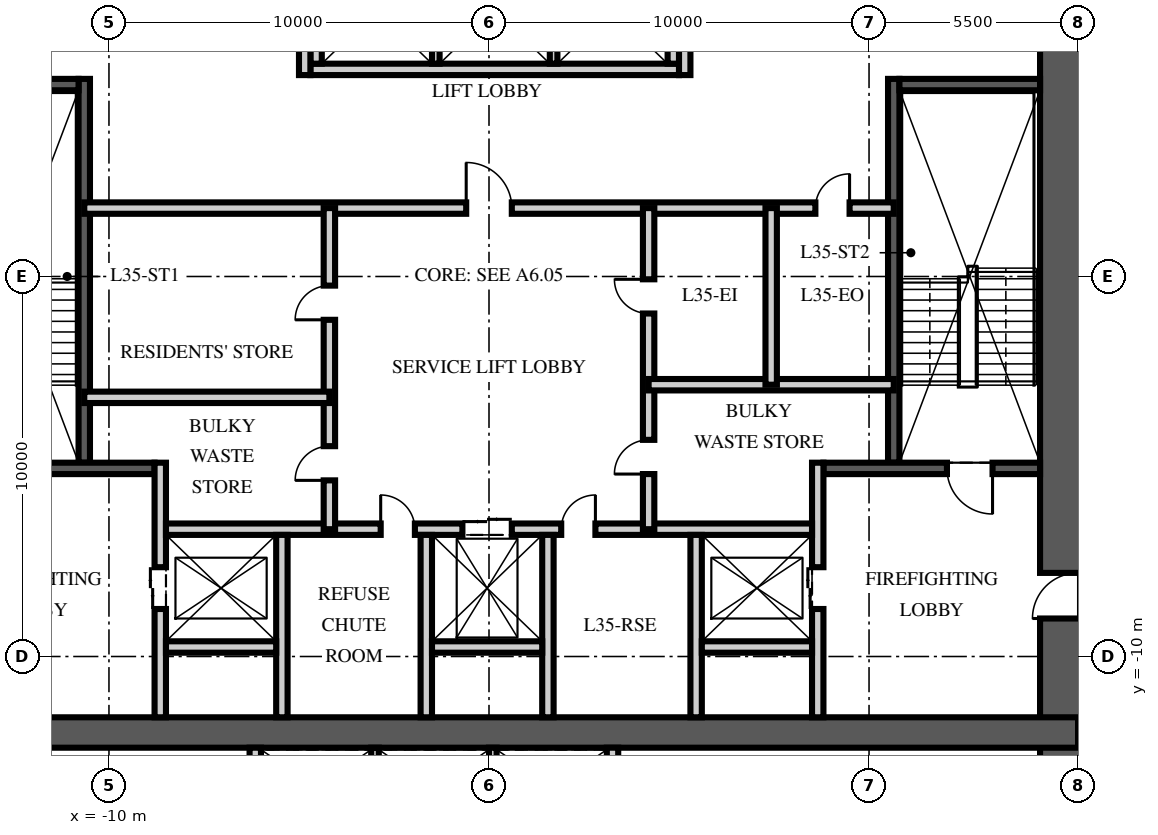
"""IFC4 building model, lengths in metres.
Left out: names, types, materials, properties, quantities, classifications, styles, units other than length and angle.
Written with IfcOpenShell. Run it as: python <this file> out.ifc"""

import sys

from ifc_helpers import new_model, si_unit, direction, frame, frame_2d, origin, place, context, subcontext, project, spatial, rectangle, extrude, element, fill, save


model = new_model("IFC4")
c1 = context("Model", 3, precision=1e-05, world=origin(), true_north=direction((0.0, 1.0)))
c2 = subcontext(c1, "Body", "Model", "MODEL_VIEW")
j1 = project(units=[si_unit("LENGTHUNIT", "METRE"), si_unit("PLANEANGLEUNIT", "RADIAN")], contexts=[c1])
p1 = place(None, origin())
s1 = spatial("IfcSite", under=j1, at=p1, CompositionType="ELEMENT")
p2 = place(p1, origin())
s2 = spatial("IfcBuilding", under=s1, at=p2, CompositionType="ELEMENT")
p3 = place(p2, frame((0.0, 0.0, 141.0)))
s3 = spatial("IfcBuildingStorey", under=s2, at=p3, CompositionType="ELEMENT", Elevation=141.0)
p4 = place(p3, frame((15.5, -15.5, -0.25), z_axis=(0.0, 0.0, 1.0), x_axis=(0.0, 1.0, 0.0)))
e1 = element("IfcWall", 1, at=p4, inside=s3, PredefinedType="SHEAR", context=c2, shape_type="SweptSolid", body=[
    extrude(rectangle(XDim=31.0, YDim=2.0, at=frame_2d((15.5, 0.0))), origin(), (0.0, 0.0, 1.0), 3.75),
])
p5 = place(p4, frame((6.5, 0.0, 0.25)))
e2 = element("IfcOpeningElement", 2, at=p5, cuts=e1, PredefinedType="OPENING", context=c2, shape_type="SweptSolid", body=[
    extrude(rectangle(XDim=1.2, YDim=2.1, at=frame_2d((0.6, 1.05))), frame((0.0, 1.01, 0.0), z_axis=(0.0, -1.0, 0.0), x_axis=(1.0, 0.0, 0.0)), (0.0, 0.0, 1.0), 2.02),
])
p6 = place(p4, frame((23.0, 0.0, 0.25)))
e3 = element("IfcOpeningElement", 3, at=p6, cuts=e1, PredefinedType="OPENING", context=c2, shape_type="SweptSolid", body=[
    extrude(rectangle(XDim=1.8, YDim=2.1, at=frame_2d((0.9, 1.05))), frame((0.0, 1.01, 0.0), z_axis=(0.0, -1.0, 0.0), x_axis=(1.0, 0.0, 0.0)), (0.0, 0.0, 1.0), 2.02),
])
p7 = place(p3, frame((-15.5, -12.0, -0.25), z_axis=(0.0, 0.0, 1.0), x_axis=(1.0, 0.0, 0.0)))
e4 = element("IfcWall", 4, at=p7, inside=s3, PredefinedType="SHEAR", context=c2, shape_type="SweptSolid", body=[
    extrude(rectangle(XDim=31.0, YDim=0.8, at=frame_2d((15.5, 0.0))), origin(), (0.0, 0.0, 1.0), 3.75),
])
p8 = place(p3, frame((-10.65, -4.9, 0.0), z_axis=(0.0, 0.0, 1.0), x_axis=(0.0, 1.0, 0.0)))
e5 = element("IfcWall", 5, at=p8, inside=s3, PredefinedType="SOLIDWALL", context=c2, shape_type="SweptSolid", body=[
    extrude(rectangle(XDim=10.1, YDim=0.3, at=frame_2d((5.05, 0.0))), origin(), (0.0, 0.0, 1.0), 3.5),
])
p9 = place(p3, frame((-14.5, -5.05, 0.0), z_axis=(0.0, 0.0, 1.0), x_axis=(1.0, 0.0, 0.0)))
e6 = element("IfcWall", 6, at=p9, inside=s3, PredefinedType="SOLIDWALL", context=c2, shape_type="SweptSolid", body=[
    extrude(rectangle(XDim=5.7, YDim=0.3, at=frame_2d((2.85, 0.0))), origin(), (0.0, 0.0, 1.0), 3.5),
])
p10 = place(p9, frame((1.25, 0.0, 0.0)))
e7 = element("IfcOpeningElement", 7, at=p10, cuts=e6, PredefinedType="OPENING", context=c2, shape_type="SweptSolid", body=[
    extrude(rectangle(XDim=1.2, YDim=2.1, at=frame_2d((0.6, 1.05))), frame((0.0, 0.16, 0.0), z_axis=(0.0, -1.0, 0.0), x_axis=(1.0, 0.0, 0.0)), (0.0, 0.0, 1.0), 0.32),
])
p11 = place(p3, frame((-14.5, 5.05, 0.0), z_axis=(0.0, 0.0, 1.0), x_axis=(1.0, 0.0, 0.0)))
e8 = element("IfcWall", 8, at=p11, inside=s3, PredefinedType="SOLIDWALL", context=c2, shape_type="SweptSolid", body=[
    extrude(rectangle(XDim=3.7, YDim=0.3, at=frame_2d((1.85, 0.0))), origin(), (0.0, 0.0, 1.0), 3.5),
])
p12 = place(p3, frame((-8.65, -11.6, 0.0), z_axis=(0.0, 0.0, 1.0), x_axis=(0.0, 1.0, 0.0)))
e9 = element("IfcWall", 9, at=p12, inside=s3, PredefinedType="PARTITIONING", context=c2, shape_type="SweptSolid", body=[
    extrude(rectangle(XDim=6.7, YDim=0.3, at=frame_2d((3.35, 0.0))), origin(), (0.0, 0.0, 1.0), 3.5),
])
p13 = place(p12, frame((2.85, 0.0, 0.0)))
e10 = element("IfcOpeningElement", 10, at=p13, cuts=e9, PredefinedType="OPENING", context=c2, shape_type="SweptSolid", body=[
    extrude(rectangle(XDim=1.1, YDim=2.1, at=frame_2d((0.55, 1.05))), frame((0.0, 0.16, 0.0), z_axis=(0.0, -1.0, 0.0), x_axis=(1.0, 0.0, 0.0)), (0.0, 0.0, 1.0), 0.32),
])
p14 = place(p3, frame((10.65, -4.9, 0.0), z_axis=(0.0, 0.0, 1.0), x_axis=(0.0, 1.0, 0.0)))
e11 = element("IfcWall", 11, at=p14, inside=s3, PredefinedType="SOLIDWALL", context=c2, shape_type="SweptSolid", body=[
    extrude(rectangle(XDim=10.1, YDim=0.3, at=frame_2d((5.05, 0.0))), origin(), (0.0, 0.0, 1.0), 3.5),
])
p15 = place(p3, frame((14.5, -5.05, 0.0), z_axis=(0.0, 0.0, 1.0), x_axis=(-1.0, 0.0, 0.0)))
e12 = element("IfcWall", 12, at=p15, inside=s3, PredefinedType="SOLIDWALL", context=c2, shape_type="SweptSolid", body=[
    extrude(rectangle(XDim=5.7, YDim=0.3, at=frame_2d((2.85, 0.0))), origin(), (0.0, 0.0, 1.0), 3.5),
])
p16 = place(p15, frame((1.25, 0.0, 0.0)))
e13 = element("IfcOpeningElement", 13, at=p16, cuts=e12, PredefinedType="OPENING", context=c2, shape_type="SweptSolid", body=[
    extrude(rectangle(XDim=1.2, YDim=2.1, at=frame_2d((0.6, 1.05))), frame((0.0, 0.16, 0.0), z_axis=(0.0, -1.0, 0.0), x_axis=(1.0, 0.0, 0.0)), (0.0, 0.0, 1.0), 0.32),
])
p17 = place(p3, frame((14.5, 5.05, 0.0), z_axis=(0.0, 0.0, 1.0), x_axis=(-1.0, 0.0, 0.0)))
e14 = element("IfcWall", 14, at=p17, inside=s3, PredefinedType="SOLIDWALL", context=c2, shape_type="SweptSolid", body=[
    extrude(rectangle(XDim=3.7, YDim=0.3, at=frame_2d((1.85, 0.0))), origin(), (0.0, 0.0, 1.0), 3.5),
])
p18 = place(p3, frame((8.65, -11.6, 0.0), z_axis=(0.0, 0.0, 1.0), x_axis=(0.0, 1.0, 0.0)))
e15 = element("IfcWall", 15, at=p18, inside=s3, PredefinedType="PARTITIONING", context=c2, shape_type="SweptSolid", body=[
    extrude(rectangle(XDim=6.7, YDim=0.3, at=frame_2d((3.35, 0.0))), origin(), (0.0, 0.0, 1.0), 3.5),
])
p19 = place(p18, frame((2.85, 0.0, 0.0)))
e16 = element("IfcOpeningElement", 16, at=p19, cuts=e15, PredefinedType="OPENING", context=c2, shape_type="SweptSolid", body=[
    extrude(rectangle(XDim=1.1, YDim=2.1, at=frame_2d((0.55, 1.05))), frame((0.0, 0.16, 0.0), z_axis=(0.0, -1.0, 0.0), x_axis=(1.0, 0.0, 0.0)), (0.0, 0.0, 1.0), 0.32),
])
p20 = place(p3, frame((-8.5, -6.65, 0.0), z_axis=(0.0, 0.0, 1.0), x_axis=(1.0, 0.0, 0.0)))
e17 = element("IfcWall", 17, at=p20, inside=s3, PredefinedType="PARTITIONING", context=c2, shape_type="SweptSolid", body=[
    extrude(rectangle(XDim=17.0, YDim=0.3, at=frame_2d((8.5, 0.0))), origin(), (0.0, 0.0, 1.0), 3.5),
])
p21 = place(p20, frame((7.8, 0.0, 0.0)))
e18 = element("IfcOpeningElement", 18, at=p21, cuts=e17, PredefinedType="OPENING", context=c2, shape_type="SweptSolid", body=[
    extrude(rectangle(XDim=1.3, YDim=2.4, at=frame_2d((0.65, 1.2))), frame((0.0, 0.16, 0.0), z_axis=(0.0, -1.0, 0.0), x_axis=(1.0, 0.0, 0.0)), (0.0, 0.0, 1.0), 0.32),
])
p22 = place(p20, frame((5.65, 0.0, 0.0)))
e19 = element("IfcOpeningElement", 19, at=p22, cuts=e17, PredefinedType="OPENING", context=c2, shape_type="SweptSolid", body=[
    extrude(rectangle(XDim=0.9, YDim=2.1, at=frame_2d((0.45, 1.05))), frame((0.0, 0.16, 0.0), z_axis=(0.0, -1.0, 0.0), x_axis=(1.0, 0.0, 0.0)), (0.0, 0.0, 1.0), 0.32),
])
p23 = place(p20, frame((10.4, 0.0, 0.0)))
e20 = element("IfcOpeningElement", 20, at=p23, cuts=e17, PredefinedType="OPENING", context=c2, shape_type="SweptSolid", body=[
    extrude(rectangle(XDim=0.9, YDim=2.1, at=frame_2d((0.45, 1.05))), frame((0.0, 0.16, 0.0), z_axis=(0.0, -1.0, 0.0), x_axis=(1.0, 0.0, 0.0)), (0.0, 0.0, 1.0), 0.32),
])
for number, where, z_axis, x_axis in (
    (21, (-5.45, -11.6, 0.0), (0.0, 0.0, 1.0), (0.0, 1.0, 0.0)),
    (22, (-1.65, -11.6, 0.0), (0.0, 0.0, 1.0), (0.0, 1.0, 0.0)),
    (23, (1.55, -11.6, 0.0), (0.0, 0.0, 1.0), (0.0, 1.0, 0.0)),
    (24, (5.45, -11.6, 0.0), (0.0, 0.0, 1.0), (0.0, 1.0, 0.0)),
):
    element("IfcWall", number, at=place(p3, frame(where, z_axis=z_axis, x_axis=x_axis)), inside=s3, PredefinedType="PARTITIONING", context=c2, shape_type="SweptSolid", body=[
        extrude(rectangle(XDim=4.8, YDim=0.3, at=frame_2d((2.4, 0.0))), origin(), (0.0, 0.0, 1.0), 3.5),
    ])
for number, where, z_axis, x_axis in (
    (25, (-8.5, -9.75, 0.0), (0.0, 0.0, 1.0), (1.0, 0.0, 0.0)),
    (26, (-1.5, -9.75, 0.0), (0.0, 0.0, 1.0), (1.0, 0.0, 0.0)),
    (27, (5.6, -9.75, 0.0), (0.0, 0.0, 1.0), (1.0, 0.0, 0.0)),
):
    element("IfcWall", number, at=place(p3, frame(where, z_axis=z_axis, x_axis=x_axis)), inside=s3, PredefinedType="PARTITIONING", context=c2, shape_type="SweptSolid", body=[
        extrude(rectangle(XDim=2.9, YDim=0.3, at=frame_2d((1.45, 0.0))), origin(), (0.0, 0.0, 1.0), 3.5),
    ])
p24 = place(p3, frame((-4.7, 5.45, 0.0), z_axis=(0.0, 0.0, 1.0), x_axis=(1.0, 0.0, 0.0)))
e28 = element("IfcWall", 28, at=p24, inside=s3, PredefinedType="PARTITIONING", context=c2, shape_type="SweptSolid", body=[
    extrude(rectangle(XDim=9.7, YDim=0.3, at=frame_2d((4.85, 0.0))), origin(), (0.0, 0.0, 1.0), 3.5),
])
for number, where, z_axis, x_axis in (
    (29, (-4.55, 5.6, 0.0), (0.0, 0.0, 1.0), (0.0, 1.0, 0.0)),
    (30, (4.85, 5.6, 0.0), (0.0, 0.0, 1.0), (0.0, 1.0, 0.0)),
):
    element("IfcWall", number, at=place(p3, frame(where, z_axis=z_axis, x_axis=x_axis)), inside=s3, PredefinedType="PARTITIONING", context=c2, shape_type="SweptSolid", body=[
        extrude(rectangle(XDim=2.8, YDim=0.3, at=frame_2d((1.4, 0.0))), origin(), (0.0, 0.0, 1.0), 3.5),
    ])
for number, where, z_axis, x_axis in (
    (31, (-1.4, 5.6, 0.0), (0.0, 0.0, 1.0), (0.0, 1.0, 0.0)),
    (32, (1.7, 5.6, 0.0), (0.0, 0.0, 1.0), (0.0, 1.0, 0.0)),
):
    element("IfcWall", number, at=place(p3, frame(where, z_axis=z_axis, x_axis=x_axis)), inside=s3, PredefinedType="PARTITIONING", context=c2, shape_type="SweptSolid", body=[
        extrude(rectangle(XDim=2.8, YDim=0.2, at=frame_2d((1.4, 0.0))), origin(), (0.0, 0.0, 1.0), 3.5),
    ])
for number, where, z_axis, x_axis in (
    (33, (-6.15, -14.5, 0.0), (0.0, 0.0, 1.0), (0.0, 1.0, 0.0)),
    (34, (3.25, -14.5, 0.0), (0.0, 0.0, 1.0), (0.0, 1.0, 0.0)),
):
    element("IfcWall", number, at=place(p3, frame(where, z_axis=z_axis, x_axis=x_axis)), inside=s3, PredefinedType="PARTITIONING", context=c2, shape_type="SweptSolid", body=[
        extrude(rectangle(XDim=2.1, YDim=0.3, at=frame_2d((1.05, 0.0))), origin(), (0.0, 0.0, 1.0), 3.5),
    ])
for number, where, z_axis, x_axis in (
    (35, (-3.0, -14.5, 0.0), (0.0, 0.0, 1.0), (0.0, 1.0, 0.0)),
    (36, (0.1, -14.5, 0.0), (0.0, 0.0, 1.0), (0.0, 1.0, 0.0)),
):
    element("IfcWall", number, at=place(p3, frame(where, z_axis=z_axis, x_axis=x_axis)), inside=s3, PredefinedType="PARTITIONING", context=c2, shape_type="SweptSolid", body=[
        extrude(rectangle(XDim=2.1, YDim=0.2, at=frame_2d((1.05, 0.0))), origin(), (0.0, 0.0, 1.0), 3.5),
    ])
p25 = place(p3, frame((-10.65, 1.8, 0.0), z_axis=(0.0, 0.0, 1.0), x_axis=(1.0, 0.0, 0.0)))
e37 = element("IfcWall", 37, at=p25, inside=s3, PredefinedType="PARTITIONING", context=c2, shape_type="SweptSolid", body=[
    extrude(rectangle(XDim=21.3, YDim=0.3, at=frame_2d((10.65, 0.0))), origin(), (0.0, 0.0, 1.0), 3.5),
])
p26 = place(p25, frame((10.05, 0.0, 0.0)))
e38 = element("IfcOpeningElement", 38, at=p26, cuts=e37, PredefinedType="OPENING", context=c2, shape_type="SweptSolid", body=[
    extrude(rectangle(XDim=1.2, YDim=2.1, at=frame_2d((0.6, 1.05))), frame((0.0, 0.16, 0.0), z_axis=(0.0, -1.0, 0.0), x_axis=(1.0, 0.0, 0.0)), (0.0, 0.0, 1.0), 0.32),
])
p27 = place(p25, frame((19.238, 0.0, 0.0)))
e39 = element("IfcOpeningElement", 39, at=p27, cuts=e37, PredefinedType="OPENING", context=c2, shape_type="SweptSolid", body=[
    extrude(rectangle(XDim=0.9, YDim=2.1, at=frame_2d((0.45, 1.05))), frame((0.0, 0.16, 0.0), z_axis=(0.0, -1.0, 0.0), x_axis=(1.0, 0.0, 0.0)), (0.0, 0.0, 1.0), 0.32),
])
p28 = place(p3, frame((-4.2, -6.65, 0.0), z_axis=(0.0, 0.0, 1.0), x_axis=(0.0, 1.0, 0.0)))
e40 = element("IfcWall", 40, at=p28, inside=s3, PredefinedType="PARTITIONING", context=c2, shape_type="SweptSolid", body=[
    extrude(rectangle(XDim=8.45, YDim=0.3, at=frame_2d((4.225, 0.0))), origin(), (0.0, 0.0, 1.0), 3.5),
])
p29 = place(p28, frame((1.285, 0.0, 0.0)))
e41 = element("IfcOpeningElement", 41, at=p29, cuts=e40, PredefinedType="OPENING", context=c2, shape_type="SweptSolid", body=[
    extrude(rectangle(XDim=0.9, YDim=2.1, at=frame_2d((0.45, 1.05))), frame((0.0, 0.16, 0.0), z_axis=(0.0, -1.0, 0.0), x_axis=(1.0, 0.0, 0.0)), (0.0, 0.0, 1.0), 0.32),
])
p30 = place(p28, frame((5.51, 0.0, 0.0)))
e42 = element("IfcOpeningElement", 42, at=p30, cuts=e40, PredefinedType="OPENING", context=c2, shape_type="SweptSolid", body=[
    extrude(rectangle(XDim=0.9, YDim=2.1, at=frame_2d((0.45, 1.05))), frame((0.0, 0.16, 0.0), z_axis=(0.0, -1.0, 0.0), x_axis=(1.0, 0.0, 0.0)), (0.0, 0.0, 1.0), 0.32),
])
p31 = place(p3, frame((4.2, -6.65, 0.0), z_axis=(0.0, 0.0, 1.0), x_axis=(0.0, 1.0, 0.0)))
e43 = element("IfcWall", 43, at=p31, inside=s3, PredefinedType="PARTITIONING", context=c2, shape_type="SweptSolid", body=[
    extrude(rectangle(XDim=8.45, YDim=0.3, at=frame_2d((4.225, 0.0))), origin(), (0.0, 0.0, 1.0), 3.5),
])
p32 = place(p31, frame((1.451, 0.0, 0.0)))
e44 = element("IfcOpeningElement", 44, at=p32, cuts=e43, PredefinedType="OPENING", context=c2, shape_type="SweptSolid", body=[
    extrude(rectangle(XDim=0.9, YDim=2.1, at=frame_2d((0.45, 1.05))), frame((0.0, 0.16, 0.0), z_axis=(0.0, -1.0, 0.0), x_axis=(1.0, 0.0, 0.0)), (0.0, 0.0, 1.0), 0.32),
])
p33 = place(p31, frame((5.676, 0.0, 0.0)))
e45 = element("IfcOpeningElement", 45, at=p33, cuts=e43, PredefinedType="OPENING", context=c2, shape_type="SweptSolid", body=[
    extrude(rectangle(XDim=0.9, YDim=2.1, at=frame_2d((0.45, 1.05))), frame((0.0, 0.16, 0.0), z_axis=(0.0, -1.0, 0.0), x_axis=(1.0, 0.0, 0.0)), (0.0, 0.0, 1.0), 0.32),
])
for number, where, z_axis, x_axis in (
    (46, (-10.65, -3.18, 0.0), (0.0, 0.0, 1.0), (1.0, 0.0, 0.0)),
    (47, (10.65, -2.848, 0.0), (0.0, 0.0, 1.0), (-1.0, 0.0, 0.0)),
):
    element("IfcWall", number, at=place(p3, frame(where, z_axis=z_axis, x_axis=x_axis)), inside=s3, PredefinedType="PARTITIONING", context=c2, shape_type="SweptSolid", body=[
        extrude(rectangle(XDim=6.45, YDim=0.3, at=frame_2d((3.225, 0.0))), origin(), (0.0, 0.0, 1.0), 3.5),
    ])
p34 = place(p3, frame((7.425, -2.848, 0.0), z_axis=(0.0, 0.0, 1.0), x_axis=(0.0, 1.0, 0.0)))
e48 = element("IfcWall", 48, at=p34, inside=s3, PredefinedType="PARTITIONING", context=c2, shape_type="SweptSolid", body=[
    extrude(rectangle(XDim=4.648, YDim=0.3, at=frame_2d((2.324, 0.0))), origin(), (0.0, 0.0, 1.0), 3.5),
])
p35 = place(p3, frame((-4.85, 5.3, 0.0), z_axis=(0.0, 0.0, 1.0), x_axis=(0.0, 1.0, 0.0)))
e49 = element("IfcWall", 49, at=p35, inside=s3, PredefinedType="PARTITIONING", context=c2, shape_type="SweptSolid", body=[
    extrude(rectangle(XDim=6.3, YDim=0.3, at=frame_2d((3.15, 0.0))), origin(), (0.0, 0.0, 1.0), 3.5),
])
p36 = place(p35, frame((4.35, 0.0, 0.0)))
e50 = element("IfcOpeningElement", 50, at=p36, cuts=e49, PredefinedType="OPENING", context=c2, shape_type="SweptSolid", body=[
    extrude(rectangle(XDim=0.9, YDim=2.1, at=frame_2d((0.45, 1.05))), frame((0.0, 0.16, 0.0), z_axis=(0.0, -1.0, 0.0), x_axis=(1.0, 0.0, 0.0)), (0.0, 0.0, 1.0), 0.32),
])
p37 = place(p3, frame((5.15, 5.3, 0.0), z_axis=(0.0, 0.0, 1.0), x_axis=(0.0, 1.0, 0.0)))
e51 = element("IfcWall", 51, at=p37, inside=s3, PredefinedType="PARTITIONING", context=c2, shape_type="SweptSolid", body=[
    extrude(rectangle(XDim=6.3, YDim=0.3, at=frame_2d((3.15, 0.0))), origin(), (0.0, 0.0, 1.0), 3.5),
])
p38 = place(p37, frame((4.35, 0.0, 0.0)))
e52 = element("IfcOpeningElement", 52, at=p38, cuts=e51, PredefinedType="OPENING", context=c2, shape_type="SweptSolid", body=[
    extrude(rectangle(XDim=0.9, YDim=2.1, at=frame_2d((0.45, 1.05))), frame((0.0, 0.16, 0.0), z_axis=(0.0, -1.0, 0.0), x_axis=(1.0, 0.0, 0.0)), (0.0, 0.0, 1.0), 0.32),
])
p39 = place(p16, origin())
e53 = element("IfcDoor", 53, at=p39, inside=s3, OperationType="SINGLE_SWING_LEFT", PredefinedType="DOOR", context=c2, shape_type="SweptSolid", body=[
    extrude(rectangle(XDim=1.2, YDim=2.1, at=frame_2d((0.6, 1.05))), frame((0.0, 0.025, 0.0), z_axis=(0.0, -1.0, 0.0), x_axis=(1.0, 0.0, 0.0)), (0.0, 0.0, 1.0), 0.05),
])
fill(e13, e53)
p40 = place(p5, origin())
e54 = element("IfcDoor", 54, at=p40, inside=s3, OperationType="SINGLE_SWING_LEFT", PredefinedType="DOOR", context=c2, shape_type="SweptSolid", body=[
    extrude(rectangle(XDim=1.2, YDim=2.1, at=frame_2d((0.6, 1.05))), frame((0.0, 0.025, 0.0), z_axis=(0.0, -1.0, 0.0), x_axis=(1.0, 0.0, 0.0)), (0.0, 0.0, 1.0), 0.05),
])
fill(e2, e54)
p41 = place(p13, origin())
e55 = element("IfcDoor", 55, at=p41, inside=s3, OperationType="DOUBLE_DOOR_SLIDING", PredefinedType="DOOR", context=c2, shape_type="SweptSolid", body=[
    extrude(rectangle(XDim=1.1, YDim=2.1, at=frame_2d((0.55, 1.05))), frame((0.0, 0.025, 0.0), z_axis=(0.0, -1.0, 0.0), x_axis=(1.0, 0.0, 0.0)), (0.0, 0.0, 1.0), 0.05),
])
fill(e10, e55)
p42 = place(p19, origin())
e56 = element("IfcDoor", 56, at=p42, inside=s3, OperationType="DOUBLE_DOOR_SLIDING", PredefinedType="DOOR", context=c2, shape_type="SweptSolid", body=[
    extrude(rectangle(XDim=1.1, YDim=2.1, at=frame_2d((0.55, 1.05))), frame((0.0, 0.025, 0.0), z_axis=(0.0, -1.0, 0.0), x_axis=(1.0, 0.0, 0.0)), (0.0, 0.0, 1.0), 0.05),
])
fill(e16, e56)
p43 = place(p21, origin())
e57 = element("IfcDoor", 57, at=p43, inside=s3, OperationType="DOUBLE_DOOR_SLIDING", PredefinedType="DOOR", context=c2, shape_type="SweptSolid", body=[
    extrude(rectangle(XDim=1.3, YDim=2.4, at=frame_2d((0.65, 1.2))), frame((0.0, 0.025, 0.0), z_axis=(0.0, -1.0, 0.0), x_axis=(1.0, 0.0, 0.0)), (0.0, 0.0, 1.0), 0.05),
])
fill(e18, e57)
p44 = place(p26, origin())
e58 = element("IfcDoor", 58, at=p44, inside=s3, OperationType="SINGLE_SWING_LEFT", PredefinedType="DOOR", context=c2, shape_type="SweptSolid", body=[
    extrude(rectangle(XDim=1.2, YDim=2.1, at=frame_2d((0.6, 1.05))), frame((0.0, 0.025, 0.0), z_axis=(0.0, -1.0, 0.0), x_axis=(1.0, 0.0, 0.0)), (0.0, 0.0, 1.0), 0.05),
])
fill(e38, e58)
p45 = place(p22, origin())
e59 = element("IfcDoor", 59, at=p45, inside=s3, OperationType="SINGLE_SWING_LEFT", PredefinedType="DOOR", context=c2, shape_type="SweptSolid", body=[
    extrude(rectangle(XDim=0.9, YDim=2.1, at=frame_2d((0.45, 1.05))), frame((0.0, 0.025, 0.0), z_axis=(0.0, -1.0, 0.0), x_axis=(1.0, 0.0, 0.0)), (0.0, 0.0, 1.0), 0.05),
])
fill(e19, e59)
p46 = place(p23, origin())
e60 = element("IfcDoor", 60, at=p46, inside=s3, OperationType="SINGLE_SWING_RIGHT", PredefinedType="DOOR", context=c2, shape_type="SweptSolid", body=[
    extrude(rectangle(XDim=0.9, YDim=2.1, at=frame_2d((0.45, 1.05))), frame((0.0, 0.025, 0.0), z_axis=(0.0, -1.0, 0.0), x_axis=(1.0, 0.0, 0.0)), (0.0, 0.0, 1.0), 0.05),
])
fill(e20, e60)
p47 = place(p29, origin())
e61 = element("IfcDoor", 61, at=p47, inside=s3, OperationType="SINGLE_SWING_LEFT", PredefinedType="DOOR", context=c2, shape_type="SweptSolid", body=[
    extrude(rectangle(XDim=0.9, YDim=2.1, at=frame_2d((0.45, 1.05))), frame((0.0, 0.025, 0.0), z_axis=(0.0, -1.0, 0.0), x_axis=(1.0, 0.0, 0.0)), (0.0, 0.0, 1.0), 0.05),
])
fill(e41, e61)
p48 = place(p30, origin())
e62 = element("IfcDoor", 62, at=p48, inside=s3, OperationType="SINGLE_SWING_LEFT", PredefinedType="DOOR", context=c2, shape_type="SweptSolid", body=[
    extrude(rectangle(XDim=0.9, YDim=2.1, at=frame_2d((0.45, 1.05))), frame((0.0, 0.025, 0.0), z_axis=(0.0, -1.0, 0.0), x_axis=(1.0, 0.0, 0.0)), (0.0, 0.0, 1.0), 0.05),
])
fill(e42, e62)
p49 = place(p32, origin())
e63 = element("IfcDoor", 63, at=p49, inside=s3, OperationType="SINGLE_SWING_LEFT", PredefinedType="DOOR", context=c2, shape_type="SweptSolid", body=[
    extrude(rectangle(XDim=0.9, YDim=2.1, at=frame_2d((0.45, 1.05))), frame((0.0, 0.025, 0.0), z_axis=(0.0, -1.0, 0.0), x_axis=(1.0, 0.0, 0.0)), (0.0, 0.0, 1.0), 0.05),
])
fill(e44, e63)
p50 = place(p33, origin())
e64 = element("IfcDoor", 64, at=p50, inside=s3, OperationType="SINGLE_SWING_RIGHT", PredefinedType="DOOR", context=c2, shape_type="SweptSolid", body=[
    extrude(rectangle(XDim=0.9, YDim=2.1, at=frame_2d((0.45, 1.05))), frame((0.0, 0.025, 0.0), z_axis=(0.0, -1.0, 0.0), x_axis=(1.0, 0.0, 0.0)), (0.0, 0.0, 1.0), 0.05),
])
fill(e45, e64)
p51 = place(p27, origin())
e65 = element("IfcDoor", 65, at=p51, inside=s3, OperationType="SINGLE_SWING_RIGHT", PredefinedType="DOOR", context=c2, shape_type="SweptSolid", body=[
    extrude(rectangle(XDim=0.9, YDim=2.1, at=frame_2d((0.45, 1.05))), frame((0.0, 0.025, 0.0), z_axis=(0.0, -1.0, 0.0), x_axis=(1.0, 0.0, 0.0)), (0.0, 0.0, 1.0), 0.05),
])
fill(e39, e65)
save(model, sys.argv[1])
